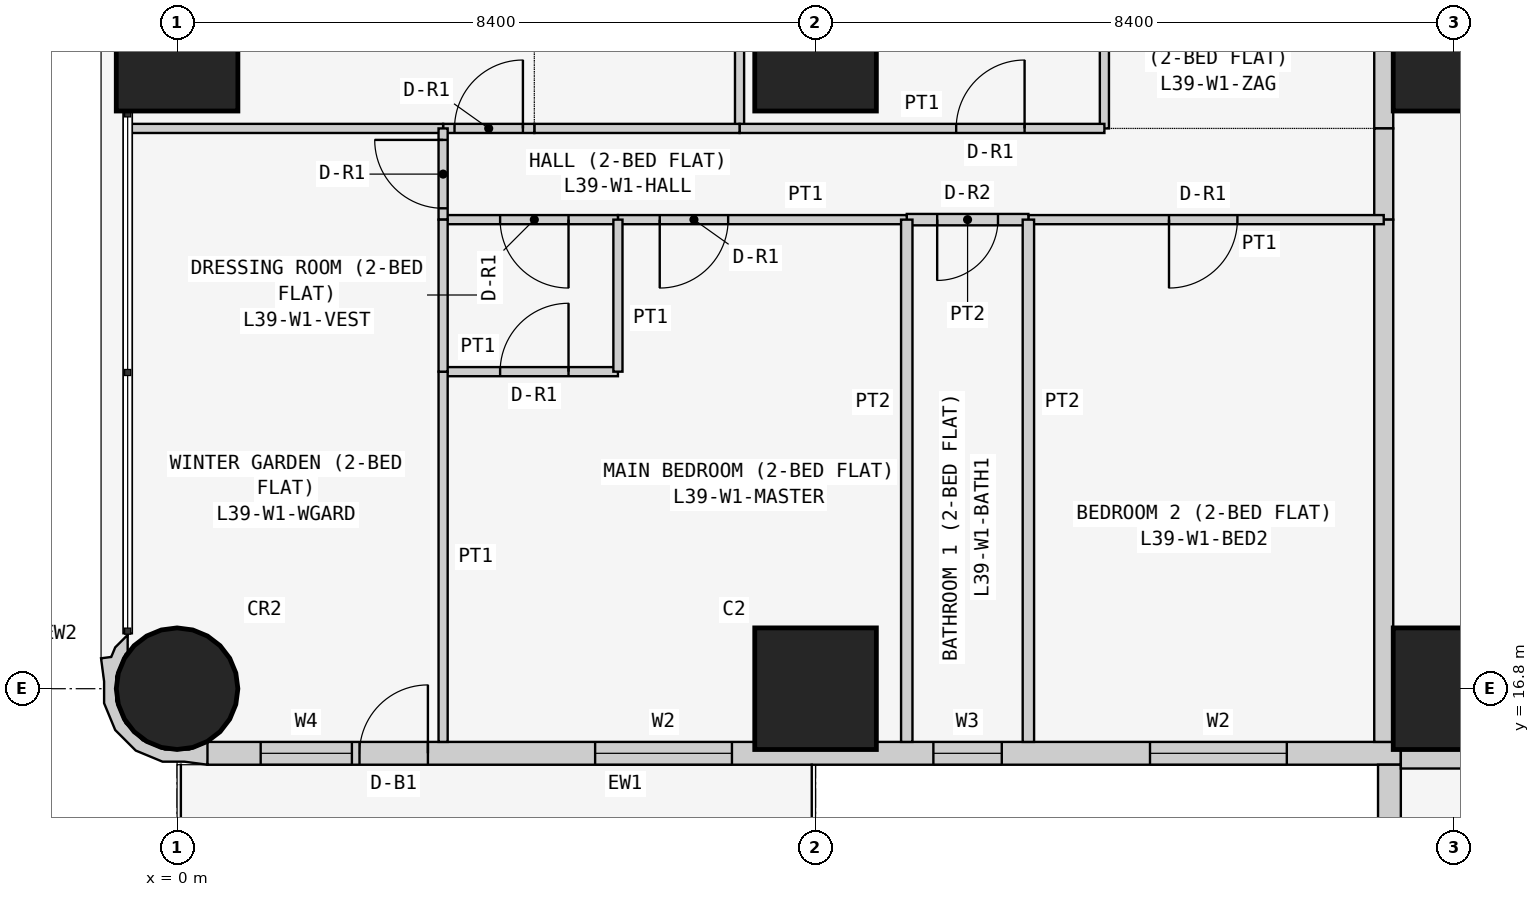
"""IFC4 building model, lengths in metres.
Left out: names, types, materials, properties, quantities, classifications, styles, units other than length and angle.
Written with IfcOpenShell. Run it as: python <this file> out.ifc"""

import sys

from ifc_helpers import new_model, si_unit, direction, frame, frame_2d, origin, origin_2d, place, context, subcontext, project, spatial, polyline, rectangle, circle, outline, extrude, element, fill, save


model = new_model("IFC4")
c1 = context("Model", 3, precision=1e-05, world=origin(), true_north=direction((0.0, 1.0)))
c2 = subcontext(c1, "Body", "Model", "MODEL_VIEW")
j1 = project(units=[si_unit("LENGTHUNIT", "METRE"), si_unit("PLANEANGLEUNIT", "RADIAN")], contexts=[c1])
p1 = place(None, origin())
s1 = spatial("IfcSite", under=j1, at=p1, CompositionType="ELEMENT")
p2 = place(p1, origin())
s2 = spatial("IfcBuilding", under=s1, at=p2, CompositionType="ELEMENT")
p3 = place(p2, frame((0.0, 0.0, 152.1)))
s3 = spatial("IfcBuildingStorey", under=s2, at=p3, CompositionType="ELEMENT", Elevation=152.1)
p4 = place(p3, frame((0.0, 16.8, 0.0), z_axis=(0.0, 0.0, 1.0), x_axis=(1.0, 0.0, 0.0)))
e1 = element("IfcColumn", 1, at=p4, inside=s3, PredefinedType="COLUMN", context=c2, shape_type="SweptSolid", body=[
    extrude(circle(Radius=0.8, at=origin_2d()), origin(), (0.0, 0.0, 1.0), 3.6),
])
for number, where, z_axis, x_axis in (
    (2, (0.0, 25.2, 0.0), (0.0, 0.0, 1.0), (1.0, 0.0, 0.0)),
    (3, (8.4, 16.8, 0.0), (0.0, 0.0, 1.0), (1.0, 0.0, 0.0)),
    (4, (8.4, 25.2, 0.0), (0.0, 0.0, 1.0), (1.0, 0.0, 0.0)),
    (5, (16.8, 16.8, 0.0), (0.0, 0.0, 1.0), (1.0, 0.0, 0.0)),
    (6, (16.8, 25.2, 0.0), (0.0, 0.0, 1.0), (1.0, 0.0, 0.0)),
):
    element("IfcColumn", number, at=place(p3, frame(where, z_axis=z_axis, x_axis=x_axis)), inside=s3, PredefinedType="COLUMN", context=c2, shape_type="SweptSolid", body=[
        extrude(rectangle(XDim=1.6, YDim=1.6, at=origin_2d()), origin(), (0.0, 0.0, 1.0), 3.6),
    ])
p5 = place(p3, frame((0.4, 15.95, 0.0), z_axis=(0.0, 0.0, 1.0), x_axis=(1.0, 0.0, 0.0)))
e7 = element("IfcWall", 7, at=p5, inside=s3, PredefinedType="SOLIDWALL", context=c2, shape_type="SweptSolid", body=[
    extrude(rectangle(XDim=15.7, YDim=0.3, at=frame_2d((7.85, 0.0))), origin(), (0.0, 0.0, 1.0), 3.45),
])
p6 = place(p5, frame((12.4, 0.0, 0.9)))
e8 = element("IfcOpeningElement", 8, at=p6, cuts=e7, PredefinedType="OPENING", context=c2, shape_type="SweptSolid", body=[
    extrude(rectangle(XDim=1.8, YDim=1.5, at=frame_2d((0.9, 0.75))), frame((0.0, 0.16, 0.0), z_axis=(0.0, -1.0, 0.0), x_axis=(1.0, 0.0, 0.0)), (0.0, 0.0, 1.0), 0.32),
])
p7 = place(p5, frame((9.55, 0.0, 1.5)))
e9 = element("IfcOpeningElement", 9, at=p7, cuts=e7, PredefinedType="OPENING", context=c2, shape_type="SweptSolid", body=[
    extrude(rectangle(XDim=0.9, YDim=0.7, at=frame_2d((0.45, 0.35))), frame((0.0, 0.16, 0.0), z_axis=(0.0, -1.0, 0.0), x_axis=(1.0, 0.0, 0.0)), (0.0, 0.0, 1.0), 0.32),
])
p8 = place(p5, frame((5.1, 0.0, 0.9)))
e10 = element("IfcOpeningElement", 10, at=p8, cuts=e7, PredefinedType="OPENING", context=c2, shape_type="SweptSolid", body=[
    extrude(rectangle(XDim=1.8, YDim=1.5, at=frame_2d((0.9, 0.75))), frame((0.0, 0.16, 0.0), z_axis=(0.0, -1.0, 0.0), x_axis=(1.0, 0.0, 0.0)), (0.0, 0.0, 1.0), 0.32),
])
p9 = place(p5, frame((2.0, 0.0, 0.0)))
e11 = element("IfcOpeningElement", 11, at=p9, cuts=e7, PredefinedType="OPENING", context=c2, shape_type="SweptSolid", body=[
    extrude(rectangle(XDim=0.9, YDim=2.4, at=frame_2d((0.45, 1.2))), frame((0.0, 0.16, 0.0), z_axis=(0.0, -1.0, 0.0), x_axis=(1.0, 0.0, 0.0)), (0.0, 0.0, 1.0), 0.32),
])
p10 = place(p5, frame((0.7, 0.0, 0.9)))
e12 = element("IfcOpeningElement", 12, at=p10, cuts=e7, PredefinedType="OPENING", context=c2, shape_type="SweptSolid", body=[
    extrude(rectangle(XDim=1.2, YDim=1.5, at=frame_2d((0.6, 0.75))), frame((0.0, 0.16, 0.0), z_axis=(0.0, -1.0, 0.0), x_axis=(1.0, 0.0, 0.0)), (0.0, 0.0, 1.0), 0.32),
])
p11 = place(p3, frame((15.95, 15.8, 0.0), z_axis=(0.0, 0.0, 1.0), x_axis=(0.0, -1.0, 0.0)))
e13 = element("IfcWall", 13, at=p11, inside=s3, PredefinedType="SOLIDWALL", context=c2, shape_type="SweptSolid", body=[
    extrude(rectangle(XDim=7.0, YDim=0.3, at=frame_2d((3.5, 0.0))), origin(), (0.0, 0.0, 1.0), 3.45),
])
p12 = place(p11, frame((1.5, 0.0, 0.9)))
e14 = element("IfcOpeningElement", 14, at=p12, cuts=e13, PredefinedType="OPENING", context=c2, shape_type="SweptSolid", body=[
    extrude(rectangle(XDim=2.4, YDim=1.5, at=frame_2d((1.2, 0.75))), frame((0.0, 0.16, 0.0), z_axis=(0.0, -1.0, 0.0), x_axis=(1.0, 0.0, 0.0)), (0.0, 0.0, 1.0), 0.32),
])
p13 = place(p11, frame((5.05, 0.0, 0.9)))
e15 = element("IfcOpeningElement", 15, at=p13, cuts=e13, PredefinedType="OPENING", context=c2, shape_type="SweptSolid", body=[
    extrude(rectangle(XDim=1.2, YDim=1.5, at=frame_2d((0.6, 0.75))), frame((0.0, 0.16, 0.0), z_axis=(0.0, -1.0, 0.0), x_axis=(1.0, 0.0, 0.0)), (0.0, 0.0, 1.0), 0.32),
])
p14 = place(p3, frame((-0.595, 17.448, 0.0), z_axis=(0.0, 0.0, 1.0), x_axis=(-0.93923434088, -0.343276641956, 0.0)))
e16 = element("IfcWall", 16, at=p14, inside=s3, PredefinedType="SOLIDWALL", context=c2, shape_type="SweptSolid", body=[
    extrude(outline(polyline([(-0.369, 1.89), (-0.509, 1.621), (-0.491, 1.614), (-0.479, 1.609), (-0.211, 1.62), (0.088, 1.511), (0.323, 1.295), (0.457, 1.006), (0.47, 0.688), (0.361, 0.389), (0.146, 0.154), (0.108, 0.137), (0.031, -0.075), (0.241, 0.023), (0.334, 0.124), (0.465, 0.094), (0.532, 0.393), (0.631, 0.663), (0.614, 1.045), (0.453, 1.391), (0.172, 1.649), (-0.098, 1.748), (-0.369, 1.89)])), origin(), (0.0, 0.0, 1.0), 3.45),
])
p15 = place(p3, frame((22.971, 15.875, 0.0), z_axis=(0.0, 0.0, 1.0), x_axis=(-1.0, 0.0, 0.0)))
e17 = element("IfcWall", 17, at=p15, inside=s3, PredefinedType="PARTITIONING", context=c2, shape_type="SweptSolid", body=[
    extrude(rectangle(XDim=6.871, YDim=0.25, at=frame_2d((3.436, 0.0))), origin(), (0.0, 0.0, 1.0), 3.45),
])
p16 = place(p3, frame((15.875, 24.171, 0.0), z_axis=(0.0, 0.0, 1.0), x_axis=(0.0, 1.0, 0.0)))
e18 = element("IfcWall", 18, at=p16, inside=s3, PredefinedType="PARTITIONING", context=c2, shape_type="SweptSolid", body=[
    extrude(rectangle(XDim=5.229, YDim=0.25, at=frame_2d((2.615, 0.0))), origin(), (0.0, 0.0, 1.0), 3.45),
])
p17 = place(p16, frame((2.129, 0.0, 0.0)))
e19 = element("IfcOpeningElement", 19, at=p17, cuts=e18, PredefinedType="OPENING", context=c2, shape_type="SweptSolid", body=[
    extrude(rectangle(XDim=1.0, YDim=2.1, at=frame_2d((0.5, 1.05))), frame((0.0, 0.135, 0.0), z_axis=(0.0, -1.0, 0.0), x_axis=(1.0, 0.0, 0.0)), (0.0, 0.0, 1.0), 0.27),
])
p18 = place(p3, frame((15.875, 22.971, 0.0), z_axis=(0.0, 0.0, 1.0), x_axis=(0.0, 1.0, 0.0)))
e20 = element("IfcWall", 20, at=p18, inside=s3, PredefinedType="PARTITIONING", context=c2, shape_type="SweptSolid", body=[
    extrude(rectangle(XDim=1.2, YDim=0.25, at=frame_2d((0.6, 0.0))), origin(), (0.0, 0.0, 1.0), 3.45),
])
p19 = place(p3, frame((15.875, 16.1, 0.0), z_axis=(0.0, 0.0, 1.0), x_axis=(0.0, 1.0, 0.0)))
e21 = element("IfcWall", 21, at=p19, inside=s3, PredefinedType="PARTITIONING", context=c2, shape_type="SweptSolid", body=[
    extrude(rectangle(XDim=6.871, YDim=0.25, at=frame_2d((3.436, 0.0))), origin(), (0.0, 0.0, 1.0), 3.45),
])
for number, where, z_axis, x_axis in (
    (22, (12.2, 29.4, 0.0), (0.0, 0.0, 1.0), (0.0, -1.0, 0.0)),
    (23, (7.4, 29.4, 0.0), (0.0, 0.0, 1.0), (0.0, -1.0, 0.0)),
):
    element("IfcWall", number, at=place(p3, frame(where, z_axis=z_axis, x_axis=x_axis)), inside=s3, PredefinedType="PARTITIONING", context=c2, shape_type="SweptSolid", body=[
        extrude(rectangle(XDim=5.229, YDim=0.12, at=frame_2d((2.615, 0.0))), origin(), (0.0, 0.0, 1.0), 3.45),
    ])
p20 = place(p3, frame((7.4, 24.171, 0.0), z_axis=(0.0, 0.0, 1.0), x_axis=(1.0, 0.0, 0.0)))
e24 = element("IfcWall", 24, at=p20, inside=s3, PredefinedType="PARTITIONING", context=c2, shape_type="SweptSolid", body=[
    extrude(rectangle(XDim=4.8, YDim=0.12, at=frame_2d((2.4, 0.0))), origin(), (0.0, 0.0, 1.0), 3.45),
])
p21 = place(p20, frame((2.85, 0.0, 0.0)))
e25 = element("IfcOpeningElement", 25, at=p21, cuts=e24, PredefinedType="OPENING", context=c2, shape_type="SweptSolid", body=[
    extrude(rectangle(XDim=0.9, YDim=2.1, at=frame_2d((0.45, 1.05))), frame((0.0, 0.07, 0.0), z_axis=(0.0, -1.0, 0.0), x_axis=(1.0, 0.0, 0.0)), (0.0, 0.0, 1.0), 0.14),
])
p22 = place(p3, frame((4.7, 24.171, 0.0), z_axis=(0.0, 0.0, 1.0), x_axis=(1.0, 0.0, 0.0)))
e26 = element("IfcWall", 26, at=p22, inside=s3, PredefinedType="PARTITIONING", context=c2, shape_type="SweptSolid", body=[
    extrude(rectangle(XDim=2.7, YDim=0.12, at=frame_2d((1.35, 0.0))), origin(), (0.0, 0.0, 1.0), 3.45),
])
p23 = place(p3, frame((3.5, 24.171, 0.0), z_axis=(0.0, 0.0, 1.0), x_axis=(1.0, 0.0, 0.0)))
e27 = element("IfcWall", 27, at=p23, inside=s3, PredefinedType="PARTITIONING", context=c2, shape_type="SweptSolid", body=[
    extrude(rectangle(XDim=1.2, YDim=0.12, at=frame_2d((0.6, 0.0))), origin(), (0.0, 0.0, 1.0), 3.45),
])
p24 = place(p23, frame((0.15, 0.0, 0.0)))
e28 = element("IfcOpeningElement", 28, at=p24, cuts=e27, PredefinedType="OPENING", context=c2, shape_type="SweptSolid", body=[
    extrude(rectangle(XDim=0.9, YDim=2.1, at=frame_2d((0.45, 1.05))), frame((0.0, 0.07, 0.0), z_axis=(0.0, -1.0, 0.0), x_axis=(1.0, 0.0, 0.0)), (0.0, 0.0, 1.0), 0.14),
])
p25 = place(p3, frame((-0.65, 24.171, 0.0), z_axis=(0.0, 0.0, 1.0), x_axis=(1.0, 0.0, 0.0)))
e29 = element("IfcWall", 29, at=p25, inside=s3, PredefinedType="PARTITIONING", context=c2, shape_type="SweptSolid", body=[
    extrude(rectangle(XDim=4.15, YDim=0.12, at=frame_2d((2.075, 0.0))), origin(), (0.0, 0.0, 1.0), 3.45),
])
p26 = place(p3, frame((11.2, 22.971, 0.0), z_axis=(0.0, 0.0, 1.0), x_axis=(1.0, 0.0, 0.0)))
e30 = element("IfcWall", 30, at=p26, inside=s3, PredefinedType="PARTITIONING", context=c2, shape_type="SweptSolid", body=[
    extrude(rectangle(XDim=4.675, YDim=0.12, at=frame_2d((2.337, 0.0))), origin(), (0.0, 0.0, 1.0), 3.45),
])
p27 = place(p26, frame((1.85, 0.0, 0.0)))
e31 = element("IfcOpeningElement", 31, at=p27, cuts=e30, PredefinedType="OPENING", context=c2, shape_type="SweptSolid", body=[
    extrude(rectangle(XDim=0.9, YDim=2.1, at=frame_2d((0.45, 1.05))), frame((0.0, 0.07, 0.0), z_axis=(0.0, -1.0, 0.0), x_axis=(1.0, 0.0, 0.0)), (0.0, 0.0, 1.0), 0.14),
])
p28 = place(p3, frame((9.6, 22.971, 0.0), z_axis=(0.0, 0.0, 1.0), x_axis=(1.0, 0.0, 0.0)))
e32 = element("IfcWall", 32, at=p28, inside=s3, PredefinedType="PARTITIONING", context=c2, shape_type="SweptSolid", body=[
    extrude(rectangle(XDim=1.6, YDim=0.15, at=frame_2d((0.8, 0.0))), origin(), (0.0, 0.0, 1.0), 3.45),
])
p29 = place(p28, frame((0.4, 0.0, 0.0)))
e33 = element("IfcOpeningElement", 33, at=p29, cuts=e32, PredefinedType="OPENING", context=c2, shape_type="SweptSolid", body=[
    extrude(rectangle(XDim=0.8, YDim=2.1, at=frame_2d((0.4, 1.05))), frame((0.0, 0.085, 0.0), z_axis=(0.0, -1.0, 0.0), x_axis=(1.0, 0.0, 0.0)), (0.0, 0.0, 1.0), 0.17),
])
p30 = place(p3, frame((5.8, 22.971, 0.0), z_axis=(0.0, 0.0, 1.0), x_axis=(1.0, 0.0, 0.0)))
e34 = element("IfcWall", 34, at=p30, inside=s3, PredefinedType="PARTITIONING", context=c2, shape_type="SweptSolid", body=[
    extrude(rectangle(XDim=3.8, YDim=0.12, at=frame_2d((1.9, 0.0))), origin(), (0.0, 0.0, 1.0), 3.45),
])
p31 = place(p30, frame((0.55, 0.0, 0.0)))
e35 = element("IfcOpeningElement", 35, at=p31, cuts=e34, PredefinedType="OPENING", context=c2, shape_type="SweptSolid", body=[
    extrude(rectangle(XDim=0.9, YDim=2.1, at=frame_2d((0.45, 1.05))), frame((0.0, 0.07, 0.0), z_axis=(0.0, -1.0, 0.0), x_axis=(1.0, 0.0, 0.0)), (0.0, 0.0, 1.0), 0.14),
])
p32 = place(p3, frame((3.5, 22.971, 0.0), z_axis=(0.0, 0.0, 1.0), x_axis=(1.0, 0.0, 0.0)))
e36 = element("IfcWall", 36, at=p32, inside=s3, PredefinedType="PARTITIONING", context=c2, shape_type="SweptSolid", body=[
    extrude(rectangle(XDim=2.3, YDim=0.12, at=frame_2d((1.15, 0.0))), origin(), (0.0, 0.0, 1.0), 3.45),
])
p33 = place(p32, frame((0.75, 0.0, 0.0)))
e37 = element("IfcOpeningElement", 37, at=p33, cuts=e36, PredefinedType="OPENING", context=c2, shape_type="SweptSolid", body=[
    extrude(rectangle(XDim=0.9, YDim=2.1, at=frame_2d((0.45, 1.05))), frame((0.0, 0.07, 0.0), z_axis=(0.0, -1.0, 0.0), x_axis=(1.0, 0.0, 0.0)), (0.0, 0.0, 1.0), 0.14),
])
p34 = place(p3, frame((3.5, 24.171, 0.0), z_axis=(0.0, 0.0, 1.0), x_axis=(0.0, -1.0, 0.0)))
e38 = element("IfcWall", 38, at=p34, inside=s3, PredefinedType="PARTITIONING", context=c2, shape_type="SweptSolid", body=[
    extrude(rectangle(XDim=1.2, YDim=0.12, at=frame_2d((0.6, 0.0))), origin(), (0.0, 0.0, 1.0), 3.45),
])
p35 = place(p34, frame((0.151, 0.0, 0.0)))
e39 = element("IfcOpeningElement", 39, at=p35, cuts=e38, PredefinedType="OPENING", context=c2, shape_type="SweptSolid", body=[
    extrude(rectangle(XDim=0.9, YDim=2.1, at=frame_2d((0.45, 1.05))), frame((0.0, 0.07, 0.0), z_axis=(0.0, -1.0, 0.0), x_axis=(1.0, 0.0, 0.0)), (0.0, 0.0, 1.0), 0.14),
])
for number, where, z_axis, x_axis in (
    (40, (11.2, 22.971, 0.0), (0.0, 0.0, 1.0), (0.0, -1.0, 0.0)),
    (41, (9.6, 22.971, 0.0), (0.0, 0.0, 1.0), (0.0, -1.0, 0.0)),
):
    element("IfcWall", number, at=place(p3, frame(where, z_axis=z_axis, x_axis=x_axis)), inside=s3, PredefinedType="PARTITIONING", context=c2, shape_type="SweptSolid", body=[
        extrude(rectangle(XDim=6.871, YDim=0.15, at=frame_2d((3.436, 0.0))), origin(), (0.0, 0.0, 1.0), 3.45),
    ])
p36 = place(p3, frame((3.5, 20.971, 0.0), z_axis=(0.0, 0.0, 1.0), x_axis=(1.0, 0.0, 0.0)))
e42 = element("IfcWall", 42, at=p36, inside=s3, PredefinedType="PARTITIONING", context=c2, shape_type="SweptSolid", body=[
    extrude(rectangle(XDim=2.3, YDim=0.12, at=frame_2d((1.15, 0.0))), origin(), (0.0, 0.0, 1.0), 3.45),
])
p37 = place(p36, frame((0.75, 0.0, 0.0)))
e43 = element("IfcOpeningElement", 43, at=p37, cuts=e42, PredefinedType="OPENING", context=c2, shape_type="SweptSolid", body=[
    extrude(rectangle(XDim=0.9, YDim=2.1, at=frame_2d((0.45, 1.05))), frame((0.0, 0.07, 0.0), z_axis=(0.0, -1.0, 0.0), x_axis=(1.0, 0.0, 0.0)), (0.0, 0.0, 1.0), 0.14),
])
p38 = place(p3, frame((5.8, 20.971, 0.0), z_axis=(0.0, 0.0, 1.0), x_axis=(0.0, 1.0, 0.0)))
e44 = element("IfcWall", 44, at=p38, inside=s3, PredefinedType="PARTITIONING", context=c2, shape_type="SweptSolid", body=[
    extrude(rectangle(XDim=2.0, YDim=0.12, at=frame_2d((1.0, 0.0))), origin(), (0.0, 0.0, 1.0), 3.45),
])
p39 = place(p3, frame((3.5, 16.1, 0.0), z_axis=(0.0, 0.0, 1.0), x_axis=(0.0, 1.0, 0.0)))
e45 = element("IfcWall", 45, at=p39, inside=s3, PredefinedType="PARTITIONING", context=c2, shape_type="SweptSolid", body=[
    extrude(rectangle(XDim=4.871, YDim=0.12, at=frame_2d((2.436, 0.0))), origin(), (0.0, 0.0, 1.0), 3.45),
])
p40 = place(p3, frame((3.5, 22.971, 0.0), z_axis=(0.0, 0.0, 1.0), x_axis=(0.0, -1.0, 0.0)))
e46 = element("IfcWall", 46, at=p40, inside=s3, PredefinedType="PARTITIONING", context=c2, shape_type="SweptSolid", body=[
    extrude(rectangle(XDim=2.0, YDim=0.12, at=frame_2d((1.0, 0.0))), origin(), (0.0, 0.0, 1.0), 3.45),
])
p41 = place(p6, origin())
e47 = element("IfcWindow", 47, at=p41, inside=s3, PartitioningType="SINGLE_PANEL", PredefinedType="WINDOW", context=c2, shape_type="SweptSolid", body=[
    extrude(rectangle(XDim=1.8, YDim=1.5, at=frame_2d((0.9, 0.75))), frame((0.0, 0.03, 0.0), z_axis=(0.0, -1.0, 0.0), x_axis=(1.0, 0.0, 0.0)), (0.0, 0.0, 1.0), 0.06),
])
fill(e8, e47)
p42 = place(p7, origin())
e48 = element("IfcWindow", 48, at=p42, inside=s3, PartitioningType="SINGLE_PANEL", PredefinedType="WINDOW", context=c2, shape_type="SweptSolid", body=[
    extrude(rectangle(XDim=0.9, YDim=0.7, at=frame_2d((0.45, 0.35))), frame((0.0, 0.03, 0.0), z_axis=(0.0, -1.0, 0.0), x_axis=(1.0, 0.0, 0.0)), (0.0, 0.0, 1.0), 0.06),
])
fill(e9, e48)
p43 = place(p8, origin())
e49 = element("IfcWindow", 49, at=p43, inside=s3, PartitioningType="SINGLE_PANEL", PredefinedType="WINDOW", context=c2, shape_type="SweptSolid", body=[
    extrude(rectangle(XDim=1.8, YDim=1.5, at=frame_2d((0.9, 0.75))), frame((0.0, 0.03, 0.0), z_axis=(0.0, -1.0, 0.0), x_axis=(1.0, 0.0, 0.0)), (0.0, 0.0, 1.0), 0.06),
])
fill(e10, e49)
p44 = place(p9, origin())
e50 = element("IfcDoor", 50, at=p44, inside=s3, OperationType="SINGLE_SWING_RIGHT", PredefinedType="DOOR", context=c2, shape_type="SweptSolid", body=[
    extrude(rectangle(XDim=0.9, YDim=2.4, at=frame_2d((0.45, 1.2))), frame((0.0, 0.025, 0.0), z_axis=(0.0, -1.0, 0.0), x_axis=(1.0, 0.0, 0.0)), (0.0, 0.0, 1.0), 0.05),
])
fill(e11, e50)
p45 = place(p10, origin())
e51 = element("IfcWindow", 51, at=p45, inside=s3, PartitioningType="SINGLE_PANEL", PredefinedType="WINDOW", context=c2, shape_type="SweptSolid", body=[
    extrude(rectangle(XDim=1.2, YDim=1.5, at=frame_2d((0.6, 0.75))), frame((0.0, 0.03, 0.0), z_axis=(0.0, -1.0, 0.0), x_axis=(1.0, 0.0, 0.0)), (0.0, 0.0, 1.0), 0.06),
])
fill(e12, e51)
p46 = place(p21, origin())
e52 = element("IfcDoor", 52, at=p46, inside=s3, OperationType="SINGLE_SWING_RIGHT", PredefinedType="DOOR", context=c2, shape_type="SweptSolid", body=[
    extrude(rectangle(XDim=0.9, YDim=2.1, at=frame_2d((0.45, 1.05))), frame((0.0, 0.025, 0.0), z_axis=(0.0, -1.0, 0.0), x_axis=(1.0, 0.0, 0.0)), (0.0, 0.0, 1.0), 0.05),
])
fill(e25, e52)
p47 = place(p24, origin())
e53 = element("IfcDoor", 53, at=p47, inside=s3, OperationType="SINGLE_SWING_RIGHT", PredefinedType="DOOR", context=c2, shape_type="SweptSolid", body=[
    extrude(rectangle(XDim=0.9, YDim=2.1, at=frame_2d((0.45, 1.05))), frame((0.0, 0.025, 0.0), z_axis=(0.0, -1.0, 0.0), x_axis=(1.0, 0.0, 0.0)), (0.0, 0.0, 1.0), 0.05),
])
fill(e28, e53)
p48 = place(p27, frame((0.9, 0.0, 0.0), z_axis=(0.0, 0.0, 1.0), x_axis=(-1.0, 0.0, 0.0)))
e54 = element("IfcDoor", 54, at=p48, inside=s3, OperationType="SINGLE_SWING_RIGHT", PredefinedType="DOOR", context=c2, shape_type="SweptSolid", body=[
    extrude(rectangle(XDim=0.9, YDim=2.1, at=frame_2d((0.45, 1.05))), frame((0.0, 0.025, 0.0), z_axis=(0.0, -1.0, 0.0), x_axis=(1.0, 0.0, 0.0)), (0.0, 0.0, 1.0), 0.05),
])
fill(e31, e54)
p49 = place(p29, frame((0.8, 0.0, 0.0), z_axis=(0.0, 0.0, 1.0), x_axis=(-1.0, 0.0, 0.0)))
e55 = element("IfcDoor", 55, at=p49, inside=s3, OperationType="SINGLE_SWING_RIGHT", PredefinedType="DOOR", context=c2, shape_type="SweptSolid", body=[
    extrude(rectangle(XDim=0.8, YDim=2.1, at=frame_2d((0.4, 1.05))), frame((0.0, 0.025, 0.0), z_axis=(0.0, -1.0, 0.0), x_axis=(1.0, 0.0, 0.0)), (0.0, 0.0, 1.0), 0.05),
])
fill(e33, e55)
p50 = place(p31, frame((0.9, 0.0, 0.0), z_axis=(0.0, 0.0, 1.0), x_axis=(-1.0, 0.0, 0.0)))
e56 = element("IfcDoor", 56, at=p50, inside=s3, OperationType="SINGLE_SWING_RIGHT", PredefinedType="DOOR", context=c2, shape_type="SweptSolid", body=[
    extrude(rectangle(XDim=0.9, YDim=2.1, at=frame_2d((0.45, 1.05))), frame((0.0, 0.025, 0.0), z_axis=(0.0, -1.0, 0.0), x_axis=(1.0, 0.0, 0.0)), (0.0, 0.0, 1.0), 0.05),
])
fill(e35, e56)
p51 = place(p33, frame((0.9, 0.0, 0.0), z_axis=(0.0, 0.0, 1.0), x_axis=(-1.0, 0.0, 0.0)))
e57 = element("IfcDoor", 57, at=p51, inside=s3, OperationType="SINGLE_SWING_LEFT", PredefinedType="DOOR", context=c2, shape_type="SweptSolid", body=[
    extrude(rectangle(XDim=0.9, YDim=2.1, at=frame_2d((0.45, 1.05))), frame((0.0, 0.025, 0.0), z_axis=(0.0, -1.0, 0.0), x_axis=(1.0, 0.0, 0.0)), (0.0, 0.0, 1.0), 0.05),
])
fill(e37, e57)
p52 = place(p37, origin())
e58 = element("IfcDoor", 58, at=p52, inside=s3, OperationType="SINGLE_SWING_RIGHT", PredefinedType="DOOR", context=c2, shape_type="SweptSolid", body=[
    extrude(rectangle(XDim=0.9, YDim=2.1, at=frame_2d((0.45, 1.05))), frame((0.0, 0.025, 0.0), z_axis=(0.0, -1.0, 0.0), x_axis=(1.0, 0.0, 0.0)), (0.0, 0.0, 1.0), 0.05),
])
fill(e43, e58)
p53 = place(p35, frame((0.9, 0.0, 0.0), z_axis=(0.0, 0.0, 1.0), x_axis=(-1.0, 0.0, 0.0)))
e59 = element("IfcDoor", 59, at=p53, inside=s3, OperationType="SINGLE_SWING_RIGHT", PredefinedType="DOOR", context=c2, shape_type="SweptSolid", body=[
    extrude(rectangle(XDim=0.9, YDim=2.1, at=frame_2d((0.45, 1.05))), frame((0.0, 0.025, 0.0), z_axis=(0.0, -1.0, 0.0), x_axis=(1.0, 0.0, 0.0)), (0.0, 0.0, 1.0), 0.05),
])
fill(e39, e59)
save(model, sys.argv[1])
